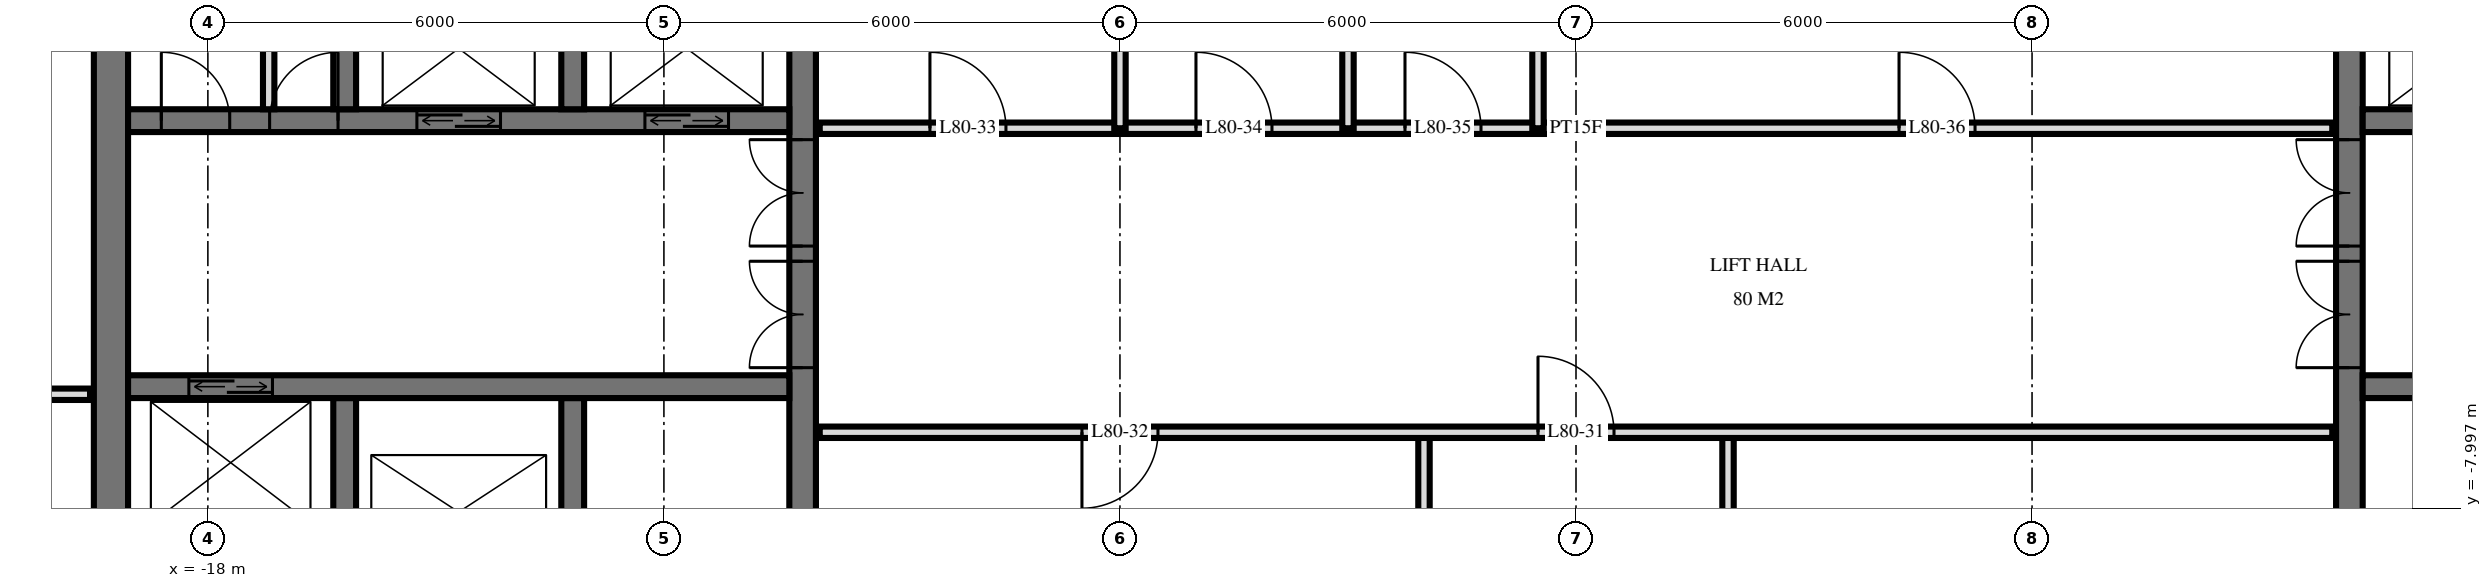
"""IFC4 building model, lengths in metres.
Left out: names, types, materials, properties, quantities, classifications, styles, units other than length and angle.
Written with IfcOpenShell. Run it as: python <this file> out.ifc"""

import sys

from ifc_helpers import new_model, si_unit, direction, frame, frame_2d, origin, place, context, subcontext, project, spatial, rectangle, extrude, element, fill, save


model = new_model("IFC4")
c1 = context("Model", 3, precision=1e-05, world=origin(), true_north=direction((0.0, 1.0)))
c2 = subcontext(c1, "Body", "Model", "MODEL_VIEW")
j1 = project(units=[si_unit("LENGTHUNIT", "METRE"), si_unit("PLANEANGLEUNIT", "RADIAN")], contexts=[c1])
p1 = place(None, origin())
s1 = spatial("IfcSite", under=j1, at=p1, CompositionType="ELEMENT")
p2 = place(p1, origin())
s2 = spatial("IfcBuilding", under=s1, at=p2, CompositionType="ELEMENT")
p3 = place(p2, frame((0.0, 0.0, 301.6)))
s3 = spatial("IfcBuildingStorey", under=s2, at=p3, CompositionType="ELEMENT", Elevation=301.6)
p4 = place(p3, frame((-10.175, -14.55, 0.0), z_axis=(0.0, 0.0, 1.0), x_axis=(0.0, 1.0, 0.0)))
e1 = element("IfcWall", 1, at=p4, inside=s3, PredefinedType="SHEAR", context=c2, shape_type="SweptSolid", body=[
    extrude(rectangle(XDim=14.1, YDim=0.35, at=frame_2d((7.05, 0.0))), origin(), (0.0, 0.0, 1.0), 3.5),
])
p5 = place(p4, frame((8.4, 0.0, 0.0)))
e2 = element("IfcOpeningElement", 2, at=p5, cuts=e1, PredefinedType="OPENING", context=c2, shape_type="SweptSolid", body=[
    extrude(rectangle(XDim=1.4, YDim=2.4, at=frame_2d((0.7, 1.2))), frame((0.0, 0.185, 0.0), z_axis=(0.0, -1.0, 0.0), x_axis=(1.0, 0.0, 0.0)), (0.0, 0.0, 1.0), 0.37),
])
p6 = place(p4, frame((10.0, 0.0, 0.0)))
e3 = element("IfcOpeningElement", 3, at=p6, cuts=e1, PredefinedType="OPENING", context=c2, shape_type="SweptSolid", body=[
    extrude(rectangle(XDim=1.4, YDim=2.4, at=frame_2d((0.7, 1.2))), frame((0.0, 0.185, 0.0), z_axis=(0.0, -1.0, 0.0), x_axis=(1.0, 0.0, 0.0)), (0.0, 0.0, 1.0), 0.37),
])
p7 = place(p4, frame((4.0, 0.0, 0.0)))
e4 = element("IfcOpeningElement", 4, at=p7, cuts=e1, PredefinedType="OPENING", context=c2, shape_type="SweptSolid", body=[
    extrude(rectangle(XDim=1.2, YDim=2.1, at=frame_2d((0.6, 1.05))), frame((0.0, 0.185, 0.0), z_axis=(0.0, -1.0, 0.0), x_axis=(1.0, 0.0, 0.0)), (0.0, 0.0, 1.0), 0.37),
])
p8 = place(p3, frame((-19.275, -14.55, 0.0), z_axis=(0.0, 0.0, 1.0), x_axis=(0.0, 1.0, 0.0)))
e5 = element("IfcWall", 5, at=p8, inside=s3, PredefinedType="SHEAR", context=c2, shape_type="SweptSolid", body=[
    extrude(rectangle(XDim=14.1, YDim=0.45, at=frame_2d((7.05, 0.0))), origin(), (0.0, 0.0, 1.0), 3.5),
])
p9 = place(p3, frame((-19.05, -2.9, 0.0), z_axis=(0.0, 0.0, 1.0), x_axis=(1.0, 0.0, 0.0)))
e6 = element("IfcWall", 6, at=p9, inside=s3, PredefinedType="SHEAR", context=c2, shape_type="SweptSolid", body=[
    extrude(rectangle(XDim=8.7, YDim=0.3, at=frame_2d((4.35, 0.0))), origin(), (0.0, 0.0, 1.0), 3.5),
])
p10 = place(p9, frame((6.8, 0.0, 0.0)))
e7 = element("IfcOpeningElement", 7, at=p10, cuts=e6, PredefinedType="OPENING", context=c2, shape_type="SweptSolid", body=[
    extrude(rectangle(XDim=1.1, YDim=2.1, at=frame_2d((0.55, 1.05))), frame((0.0, 0.16, 0.0), z_axis=(0.0, -1.0, 0.0), x_axis=(1.0, 0.0, 0.0)), (0.0, 0.0, 1.0), 0.32),
])
p11 = place(p9, frame((3.8, 0.0, 0.0)))
e8 = element("IfcOpeningElement", 8, at=p11, cuts=e6, PredefinedType="OPENING", context=c2, shape_type="SweptSolid", body=[
    extrude(rectangle(XDim=1.1, YDim=2.1, at=frame_2d((0.55, 1.05))), frame((0.0, 0.16, 0.0), z_axis=(0.0, -1.0, 0.0), x_axis=(1.0, 0.0, 0.0)), (0.0, 0.0, 1.0), 0.32),
])
p12 = place(p9, frame((1.863, 0.0, 0.0)))
e9 = element("IfcOpeningElement", 9, at=p12, cuts=e6, PredefinedType="OPENING", context=c2, shape_type="SweptSolid", body=[
    extrude(rectangle(XDim=0.9, YDim=2.1, at=frame_2d((0.45, 1.05))), frame((0.0, 0.16, 0.0), z_axis=(0.0, -1.0, 0.0), x_axis=(1.0, 0.0, 0.0)), (0.0, 0.0, 1.0), 0.32),
])
p13 = place(p9, frame((0.438, 0.0, 0.0)))
e10 = element("IfcOpeningElement", 10, at=p13, cuts=e6, PredefinedType="OPENING", context=c2, shape_type="SweptSolid", body=[
    extrude(rectangle(XDim=0.9, YDim=2.1, at=frame_2d((0.45, 1.05))), frame((0.0, 0.16, 0.0), z_axis=(0.0, -1.0, 0.0), x_axis=(1.0, 0.0, 0.0)), (0.0, 0.0, 1.0), 0.32),
])
p14 = place(p3, frame((-19.05, -6.4, 0.0), z_axis=(0.0, 0.0, 1.0), x_axis=(1.0, 0.0, 0.0)))
e11 = element("IfcWall", 11, at=p14, inside=s3, PredefinedType="SHEAR", context=c2, shape_type="SweptSolid", body=[
    extrude(rectangle(XDim=8.7, YDim=0.3, at=frame_2d((4.35, 0.0))), origin(), (0.0, 0.0, 1.0), 3.5),
])
p15 = place(p14, frame((0.8, 0.0, 0.0)))
e12 = element("IfcOpeningElement", 12, at=p15, cuts=e11, PredefinedType="OPENING", context=c2, shape_type="SweptSolid", body=[
    extrude(rectangle(XDim=1.1, YDim=2.1, at=frame_2d((0.55, 1.05))), frame((0.0, 0.16, 0.0), z_axis=(0.0, -1.0, 0.0), x_axis=(1.0, 0.0, 0.0)), (0.0, 0.0, 1.0), 0.32),
])
for number, where, z_axis, x_axis in (
    (13, (-13.2, -2.75, 0.0), (0.0, 0.0, 1.0), (0.0, 1.0, 0.0)),
    (14, (-13.2, -8.85, 0.0), (0.0, 0.0, 1.0), (0.0, 1.0, 0.0)),
    (15, (-16.2, -2.75, 0.0), (0.0, 0.0, 1.0), (0.0, 1.0, 0.0)),
    (16, (-16.2, -8.85, 0.0), (0.0, 0.0, 1.0), (0.0, 1.0, 0.0)),
):
    element("IfcWall", number, at=place(p3, frame(where, z_axis=z_axis, x_axis=x_axis)), inside=s3, PredefinedType="SHEAR", context=c2, shape_type="SweptSolid", body=[
        extrude(rectangle(XDim=2.3, YDim=0.3, at=frame_2d((1.15, 0.0))), origin(), (0.0, 0.0, 1.0), 3.5),
    ])
p16 = place(p3, frame((10.175, -14.55, 0.0), z_axis=(0.0, 0.0, 1.0), x_axis=(0.0, 1.0, 0.0)))
e17 = element("IfcWall", 17, at=p16, inside=s3, PredefinedType="SHEAR", context=c2, shape_type="SweptSolid", body=[
    extrude(rectangle(XDim=14.1, YDim=0.35, at=frame_2d((7.05, 0.0))), origin(), (0.0, 0.0, 1.0), 3.5),
])
p17 = place(p16, frame((8.4, 0.0, 0.0)))
e18 = element("IfcOpeningElement", 18, at=p17, cuts=e17, PredefinedType="OPENING", context=c2, shape_type="SweptSolid", body=[
    extrude(rectangle(XDim=1.4, YDim=2.4, at=frame_2d((0.7, 1.2))), frame((0.0, 0.185, 0.0), z_axis=(0.0, -1.0, 0.0), x_axis=(1.0, 0.0, 0.0)), (0.0, 0.0, 1.0), 0.37),
])
p18 = place(p16, frame((10.0, 0.0, 0.0)))
e19 = element("IfcOpeningElement", 19, at=p18, cuts=e17, PredefinedType="OPENING", context=c2, shape_type="SweptSolid", body=[
    extrude(rectangle(XDim=1.4, YDim=2.4, at=frame_2d((0.7, 1.2))), frame((0.0, 0.185, 0.0), z_axis=(0.0, -1.0, 0.0), x_axis=(1.0, 0.0, 0.0)), (0.0, 0.0, 1.0), 0.37),
])
p19 = place(p16, frame((4.0, 0.0, 0.0)))
e20 = element("IfcOpeningElement", 20, at=p19, cuts=e17, PredefinedType="OPENING", context=c2, shape_type="SweptSolid", body=[
    extrude(rectangle(XDim=1.2, YDim=2.1, at=frame_2d((0.6, 1.05))), frame((0.0, 0.185, 0.0), z_axis=(0.0, -1.0, 0.0), x_axis=(1.0, 0.0, 0.0)), (0.0, 0.0, 1.0), 0.37),
])
p20 = place(p3, frame((10.35, -2.9, 0.0), z_axis=(0.0, 0.0, 1.0), x_axis=(1.0, 0.0, 0.0)))
e21 = element("IfcWall", 21, at=p20, inside=s3, PredefinedType="SHEAR", context=c2, shape_type="SweptSolid", body=[
    extrude(rectangle(XDim=8.7, YDim=0.3, at=frame_2d((4.35, 0.0))), origin(), (0.0, 0.0, 1.0), 3.5),
])
p21 = place(p20, frame((0.8, 0.0, 0.0)))
e22 = element("IfcOpeningElement", 22, at=p21, cuts=e21, PredefinedType="OPENING", context=c2, shape_type="SweptSolid", body=[
    extrude(rectangle(XDim=1.1, YDim=2.1, at=frame_2d((0.55, 1.05))), frame((0.0, 0.16, 0.0), z_axis=(0.0, -1.0, 0.0), x_axis=(1.0, 0.0, 0.0)), (0.0, 0.0, 1.0), 0.32),
])
p22 = place(p20, frame((3.8, 0.0, 0.0)))
e23 = element("IfcOpeningElement", 23, at=p22, cuts=e21, PredefinedType="OPENING", context=c2, shape_type="SweptSolid", body=[
    extrude(rectangle(XDim=1.1, YDim=2.1, at=frame_2d((0.55, 1.05))), frame((0.0, 0.16, 0.0), z_axis=(0.0, -1.0, 0.0), x_axis=(1.0, 0.0, 0.0)), (0.0, 0.0, 1.0), 0.32),
])
p23 = place(p20, frame((5.938, 0.0, 0.0)))
e24 = element("IfcOpeningElement", 24, at=p23, cuts=e21, PredefinedType="OPENING", context=c2, shape_type="SweptSolid", body=[
    extrude(rectangle(XDim=0.9, YDim=2.1, at=frame_2d((0.45, 1.05))), frame((0.0, 0.16, 0.0), z_axis=(0.0, -1.0, 0.0), x_axis=(1.0, 0.0, 0.0)), (0.0, 0.0, 1.0), 0.32),
])
p24 = place(p20, frame((7.363, 0.0, 0.0)))
e25 = element("IfcOpeningElement", 25, at=p24, cuts=e21, PredefinedType="OPENING", context=c2, shape_type="SweptSolid", body=[
    extrude(rectangle(XDim=0.9, YDim=2.1, at=frame_2d((0.45, 1.05))), frame((0.0, 0.16, 0.0), z_axis=(0.0, -1.0, 0.0), x_axis=(1.0, 0.0, 0.0)), (0.0, 0.0, 1.0), 0.32),
])
p25 = place(p3, frame((10.35, -6.4, 0.0), z_axis=(0.0, 0.0, 1.0), x_axis=(1.0, 0.0, 0.0)))
e26 = element("IfcWall", 26, at=p25, inside=s3, PredefinedType="SHEAR", context=c2, shape_type="SweptSolid", body=[
    extrude(rectangle(XDim=8.7, YDim=0.3, at=frame_2d((4.35, 0.0))), origin(), (0.0, 0.0, 1.0), 3.5),
])
p26 = place(p25, frame((6.8, 0.0, 0.0)))
e27 = element("IfcOpeningElement", 27, at=p26, cuts=e26, PredefinedType="OPENING", context=c2, shape_type="SweptSolid", body=[
    extrude(rectangle(XDim=1.1, YDim=2.1, at=frame_2d((0.55, 1.05))), frame((0.0, 0.16, 0.0), z_axis=(0.0, -1.0, 0.0), x_axis=(1.0, 0.0, 0.0)), (0.0, 0.0, 1.0), 0.32),
])
p27 = place(p3, frame((-17.2, -2.75, 0.0), z_axis=(0.0, 0.0, 1.0), x_axis=(0.0, 1.0, 0.0)))
e28 = element("IfcWall", 28, at=p27, inside=s3, PredefinedType="PARTITIONING", context=c2, shape_type="SweptSolid", body=[
    extrude(rectangle(XDim=2.3, YDim=0.15, at=frame_2d((1.15, 0.0))), origin(), (0.0, 0.0, 1.0), 3.2),
])
p28 = place(p3, frame((2.0, -11.0, 0.0), z_axis=(0.0, 0.0, 1.0), x_axis=(0.0, 1.0, 0.0)))
e29 = element("IfcWall", 29, at=p28, inside=s3, PredefinedType="PARTITIONING", context=c2, shape_type="SweptSolid", body=[
    extrude(rectangle(XDim=4.0, YDim=0.15, at=frame_2d((2.0, 0.0))), origin(), (0.0, 0.0, 1.0), 3.22),
])
p29 = place(p3, frame((-0.5, -3.0, 0.0), z_axis=(0.0, 0.0, 1.0), x_axis=(0.0, 1.0, 0.0)))
e30 = element("IfcWall", 30, at=p29, inside=s3, PredefinedType="PLUMBINGWALL", context=c2, shape_type="SweptSolid", body=[
    extrude(rectangle(XDim=4.02, YDim=0.15, at=frame_2d((2.01, 0.0))), origin(), (0.0, 0.0, 1.0), 3.22),
])
p30 = place(p3, frame((-2.0, -11.0, 0.0), z_axis=(0.0, 0.0, 1.0), x_axis=(0.0, 1.0, 0.0)))
e31 = element("IfcWall", 31, at=p30, inside=s3, PredefinedType="PARTITIONING", context=c2, shape_type="SweptSolid", body=[
    extrude(rectangle(XDim=4.0, YDim=0.15, at=frame_2d((2.0, 0.0))), origin(), (0.0, 0.0, 1.0), 3.22),
])
for number, where, z_axis, x_axis in (
    (32, (-3.0, -3.0, 0.0), (0.0, 0.0, 1.0), (0.0, 1.0, 0.0)),
    (33, (-6.0, -3.0, 0.0), (0.0, 0.0, 1.0), (0.0, 1.0, 0.0)),
):
    element("IfcWall", number, at=place(p3, frame(where, z_axis=z_axis, x_axis=x_axis)), inside=s3, PredefinedType="PLUMBINGWALL", context=c2, shape_type="SweptSolid", body=[
        extrude(rectangle(XDim=4.02, YDim=0.15, at=frame_2d((2.01, 0.0))), origin(), (0.0, 0.0, 1.0), 3.22),
    ])
p31 = place(p3, frame((-9.95, -7.0, 0.0), z_axis=(0.0, 0.0, 1.0), x_axis=(1.0, 0.0, 0.0)))
e34 = element("IfcWall", 34, at=p31, inside=s3, PredefinedType="PARTITIONING", context=c2, shape_type="SweptSolid", body=[
    extrude(rectangle(XDim=19.9, YDim=0.15, at=frame_2d((9.95, 0.0))), origin(), (0.0, 0.0, 1.0), 3.22),
])
p32 = place(p31, frame((9.45, 0.0, 0.0)))
e35 = element("IfcOpeningElement", 35, at=p32, cuts=e34, PredefinedType="OPENING", context=c2, shape_type="SweptSolid", body=[
    extrude(rectangle(XDim=1.0, YDim=2.1, at=frame_2d((0.5, 1.05))), frame((0.0, 0.085, 0.0), z_axis=(0.0, -1.0, 0.0), x_axis=(1.0, 0.0, 0.0)), (0.0, 0.0, 1.0), 0.17),
])
p33 = place(p31, frame((3.45, 0.0, 0.0)))
e36 = element("IfcOpeningElement", 36, at=p33, cuts=e34, PredefinedType="OPENING", context=c2, shape_type="SweptSolid", body=[
    extrude(rectangle(XDim=1.0, YDim=2.1, at=frame_2d((0.5, 1.05))), frame((0.0, 0.085, 0.0), z_axis=(0.0, -1.0, 0.0), x_axis=(1.0, 0.0, 0.0)), (0.0, 0.0, 1.0), 0.17),
])
p34 = place(p3, frame((-22.92, -6.5, 0.0), z_axis=(0.0, 0.0, 1.0), x_axis=(1.0, 0.0, 0.0)))
e37 = element("IfcWall", 37, at=p34, inside=s3, PredefinedType="PARTITIONING", context=c2, shape_type="SweptSolid", body=[
    extrude(rectangle(XDim=3.37, YDim=0.15, at=frame_2d((1.685, 0.0))), origin(), (0.0, 0.0, 1.0), 3.22),
])
p35 = place(p34, frame((1.17, 0.0, 0.0)))
e38 = element("IfcOpeningElement", 38, at=p35, cuts=e37, PredefinedType="OPENING", context=c2, shape_type="SweptSolid", body=[
    extrude(rectangle(XDim=0.9, YDim=2.1, at=frame_2d((0.45, 1.05))), frame((0.0, 0.085, 0.0), z_axis=(0.0, -1.0, 0.0), x_axis=(1.0, 0.0, 0.0)), (0.0, 0.0, 1.0), 0.17),
])
p36 = place(p3, frame((-9.95, -3.0, 0.0), z_axis=(0.0, 0.0, 1.0), x_axis=(1.0, 0.0, 0.0)))
e39 = element("IfcWall", 39, at=p36, inside=s3, PredefinedType="PARTITIONING", context=c2, shape_type="SweptSolid", body=[
    extrude(rectangle(XDim=19.9, YDim=0.15, at=frame_2d((9.95, 0.0))), origin(), (0.0, 0.0, 1.0), 3.22),
])
p37 = place(p36, frame((1.45, 0.0, 0.0)))
e40 = element("IfcOpeningElement", 40, at=p37, cuts=e39, PredefinedType="OPENING", context=c2, shape_type="SweptSolid", body=[
    extrude(rectangle(XDim=1.0, YDim=2.1, at=frame_2d((0.5, 1.05))), frame((0.0, 0.085, 0.0), z_axis=(0.0, -1.0, 0.0), x_axis=(1.0, 0.0, 0.0)), (0.0, 0.0, 1.0), 0.17),
])
p38 = place(p36, frame((4.95, 0.0, 0.0)))
e41 = element("IfcOpeningElement", 41, at=p38, cuts=e39, PredefinedType="OPENING", context=c2, shape_type="SweptSolid", body=[
    extrude(rectangle(XDim=1.0, YDim=2.1, at=frame_2d((0.5, 1.05))), frame((0.0, 0.085, 0.0), z_axis=(0.0, -1.0, 0.0), x_axis=(1.0, 0.0, 0.0)), (0.0, 0.0, 1.0), 0.17),
])
p39 = place(p36, frame((7.7, 0.0, 0.0)))
e42 = element("IfcOpeningElement", 42, at=p39, cuts=e39, PredefinedType="OPENING", context=c2, shape_type="SweptSolid", body=[
    extrude(rectangle(XDim=1.0, YDim=2.1, at=frame_2d((0.5, 1.05))), frame((0.0, 0.085, 0.0), z_axis=(0.0, -1.0, 0.0), x_axis=(1.0, 0.0, 0.0)), (0.0, 0.0, 1.0), 0.17),
])
p40 = place(p36, frame((14.2, 0.0, 0.0)))
e43 = element("IfcOpeningElement", 43, at=p40, cuts=e39, PredefinedType="OPENING", context=c2, shape_type="SweptSolid", body=[
    extrude(rectangle(XDim=1.0, YDim=2.1, at=frame_2d((0.5, 1.05))), frame((0.0, 0.085, 0.0), z_axis=(0.0, -1.0, 0.0), x_axis=(1.0, 0.0, 0.0)), (0.0, 0.0, 1.0), 0.17),
])
p41 = place(p10, origin())
e44 = element("IfcDoor", 44, at=p41, inside=s3, OperationType="DOUBLE_DOOR_SLIDING", PredefinedType="USERDEFINED", context=c2, shape_type="SweptSolid", body=[
    extrude(rectangle(XDim=1.1, YDim=2.1, at=frame_2d((0.55, 1.05))), frame((0.0, 0.025, 0.0), z_axis=(0.0, -1.0, 0.0), x_axis=(1.0, 0.0, 0.0)), (0.0, 0.0, 1.0), 0.05),
])
fill(e7, e44)
p42 = place(p11, origin())
e45 = element("IfcDoor", 45, at=p42, inside=s3, OperationType="DOUBLE_DOOR_SLIDING", PredefinedType="USERDEFINED", context=c2, shape_type="SweptSolid", body=[
    extrude(rectangle(XDim=1.1, YDim=2.1, at=frame_2d((0.55, 1.05))), frame((0.0, 0.025, 0.0), z_axis=(0.0, -1.0, 0.0), x_axis=(1.0, 0.0, 0.0)), (0.0, 0.0, 1.0), 0.05),
])
fill(e8, e45)
p43 = place(p15, origin())
e46 = element("IfcDoor", 46, at=p43, inside=s3, OperationType="DOUBLE_DOOR_SLIDING", PredefinedType="USERDEFINED", context=c2, shape_type="SweptSolid", body=[
    extrude(rectangle(XDim=1.1, YDim=2.1, at=frame_2d((0.55, 1.05))), frame((0.0, 0.025, 0.0), z_axis=(0.0, -1.0, 0.0), x_axis=(1.0, 0.0, 0.0)), (0.0, 0.0, 1.0), 0.05),
])
fill(e12, e46)
p44 = place(p5, origin())
e47 = element("IfcDoor", 47, at=p44, inside=s3, OperationType="DOUBLE_DOOR_SINGLE_SWING", PredefinedType="DOOR", context=c2, shape_type="SweptSolid", body=[
    extrude(rectangle(XDim=1.4, YDim=2.4, at=frame_2d((0.7, 1.2))), frame((0.0, 0.025, 0.0), z_axis=(0.0, -1.0, 0.0), x_axis=(1.0, 0.0, 0.0)), (0.0, 0.0, 1.0), 0.05),
])
fill(e2, e47)
p45 = place(p6, origin())
e48 = element("IfcDoor", 48, at=p45, inside=s3, OperationType="DOUBLE_DOOR_SINGLE_SWING", PredefinedType="DOOR", context=c2, shape_type="SweptSolid", body=[
    extrude(rectangle(XDim=1.4, YDim=2.4, at=frame_2d((0.7, 1.2))), frame((0.0, 0.025, 0.0), z_axis=(0.0, -1.0, 0.0), x_axis=(1.0, 0.0, 0.0)), (0.0, 0.0, 1.0), 0.05),
])
fill(e3, e48)
p46 = place(p12, origin())
e49 = element("IfcDoor", 49, at=p46, inside=s3, OperationType="SINGLE_SWING_LEFT", PredefinedType="DOOR", context=c2, shape_type="SweptSolid", body=[
    extrude(rectangle(XDim=0.9, YDim=2.1, at=frame_2d((0.45, 1.05))), frame((0.0, 0.025, 0.0), z_axis=(0.0, -1.0, 0.0), x_axis=(1.0, 0.0, 0.0)), (0.0, 0.0, 1.0), 0.05),
])
fill(e9, e49)
p47 = place(p13, origin())
e50 = element("IfcDoor", 50, at=p47, inside=s3, OperationType="SINGLE_SWING_RIGHT", PredefinedType="DOOR", context=c2, shape_type="SweptSolid", body=[
    extrude(rectangle(XDim=0.9, YDim=2.1, at=frame_2d((0.45, 1.05))), frame((0.0, 0.025, 0.0), z_axis=(0.0, -1.0, 0.0), x_axis=(1.0, 0.0, 0.0)), (0.0, 0.0, 1.0), 0.05),
])
fill(e10, e50)
p48 = place(p17, origin())
e51 = element("IfcDoor", 51, at=p48, inside=s3, OperationType="DOUBLE_DOOR_SINGLE_SWING", PredefinedType="DOOR", context=c2, shape_type="SweptSolid", body=[
    extrude(rectangle(XDim=1.4, YDim=2.4, at=frame_2d((0.7, 1.2))), frame((0.0, 0.025, 0.0), z_axis=(0.0, -1.0, 0.0), x_axis=(1.0, 0.0, 0.0)), (0.0, 0.0, 1.0), 0.05),
])
fill(e18, e51)
p49 = place(p18, origin())
e52 = element("IfcDoor", 52, at=p49, inside=s3, OperationType="DOUBLE_DOOR_SINGLE_SWING", PredefinedType="DOOR", context=c2, shape_type="SweptSolid", body=[
    extrude(rectangle(XDim=1.4, YDim=2.4, at=frame_2d((0.7, 1.2))), frame((0.0, 0.025, 0.0), z_axis=(0.0, -1.0, 0.0), x_axis=(1.0, 0.0, 0.0)), (0.0, 0.0, 1.0), 0.05),
])
fill(e19, e52)
p50 = place(p32, origin())
e53 = element("IfcDoor", 53, at=p50, inside=s3, OperationType="SINGLE_SWING_RIGHT", PredefinedType="DOOR", context=c2, shape_type="SweptSolid", body=[
    extrude(rectangle(XDim=1.0, YDim=2.1, at=frame_2d((0.5, 1.05))), frame((0.0, 0.025, 0.0), z_axis=(0.0, -1.0, 0.0), x_axis=(1.0, 0.0, 0.0)), (0.0, 0.0, 1.0), 0.05),
])
fill(e35, e53)
p51 = place(p33, frame((0.5, 0.0, 0.0), z_axis=(0.0, 0.0, 1.0), x_axis=(-1.0, 0.0, 0.0)))
e54 = element("IfcDoor", 54, at=p51, inside=s3, OperationType="SINGLE_SWING_LEFT", PredefinedType="DOOR", context=c2, shape_type="SweptSolid", body=[
    extrude(rectangle(XDim=1.0, YDim=2.1, at=frame_2d((0.0, 1.05))), frame((0.0, -0.025, 0.0), z_axis=(0.0, 1.0, 0.0), x_axis=(-1.0, 0.0, 0.0)), (0.0, 0.0, 1.0), 0.05),
])
fill(e36, e54)
p52 = place(p37, origin())
e55 = element("IfcDoor", 55, at=p52, inside=s3, OperationType="SINGLE_SWING_RIGHT", PredefinedType="DOOR", context=c2, shape_type="SweptSolid", body=[
    extrude(rectangle(XDim=1.0, YDim=2.1, at=frame_2d((0.5, 1.05))), frame((0.0, 0.025, 0.0), z_axis=(0.0, -1.0, 0.0), x_axis=(1.0, 0.0, 0.0)), (0.0, 0.0, 1.0), 0.05),
])
fill(e40, e55)
p53 = place(p38, origin())
e56 = element("IfcDoor", 56, at=p53, inside=s3, OperationType="SINGLE_SWING_RIGHT", PredefinedType="DOOR", context=c2, shape_type="SweptSolid", body=[
    extrude(rectangle(XDim=1.0, YDim=2.1, at=frame_2d((0.5, 1.05))), frame((0.0, 0.025, 0.0), z_axis=(0.0, -1.0, 0.0), x_axis=(1.0, 0.0, 0.0)), (0.0, 0.0, 1.0), 0.05),
])
fill(e41, e56)
p54 = place(p39, origin())
e57 = element("IfcDoor", 57, at=p54, inside=s3, OperationType="SINGLE_SWING_RIGHT", PredefinedType="DOOR", context=c2, shape_type="SweptSolid", body=[
    extrude(rectangle(XDim=1.0, YDim=2.1, at=frame_2d((0.5, 1.05))), frame((0.0, 0.025, 0.0), z_axis=(0.0, -1.0, 0.0), x_axis=(1.0, 0.0, 0.0)), (0.0, 0.0, 1.0), 0.05),
])
fill(e42, e57)
p55 = place(p40, origin())
e58 = element("IfcDoor", 58, at=p55, inside=s3, OperationType="SINGLE_SWING_RIGHT", PredefinedType="DOOR", context=c2, shape_type="SweptSolid", body=[
    extrude(rectangle(XDim=1.0, YDim=2.1, at=frame_2d((0.5, 1.05))), frame((0.0, 0.025, 0.0), z_axis=(0.0, -1.0, 0.0), x_axis=(1.0, 0.0, 0.0)), (0.0, 0.0, 1.0), 0.05),
])
fill(e43, e58)
save(model, sys.argv[1])
